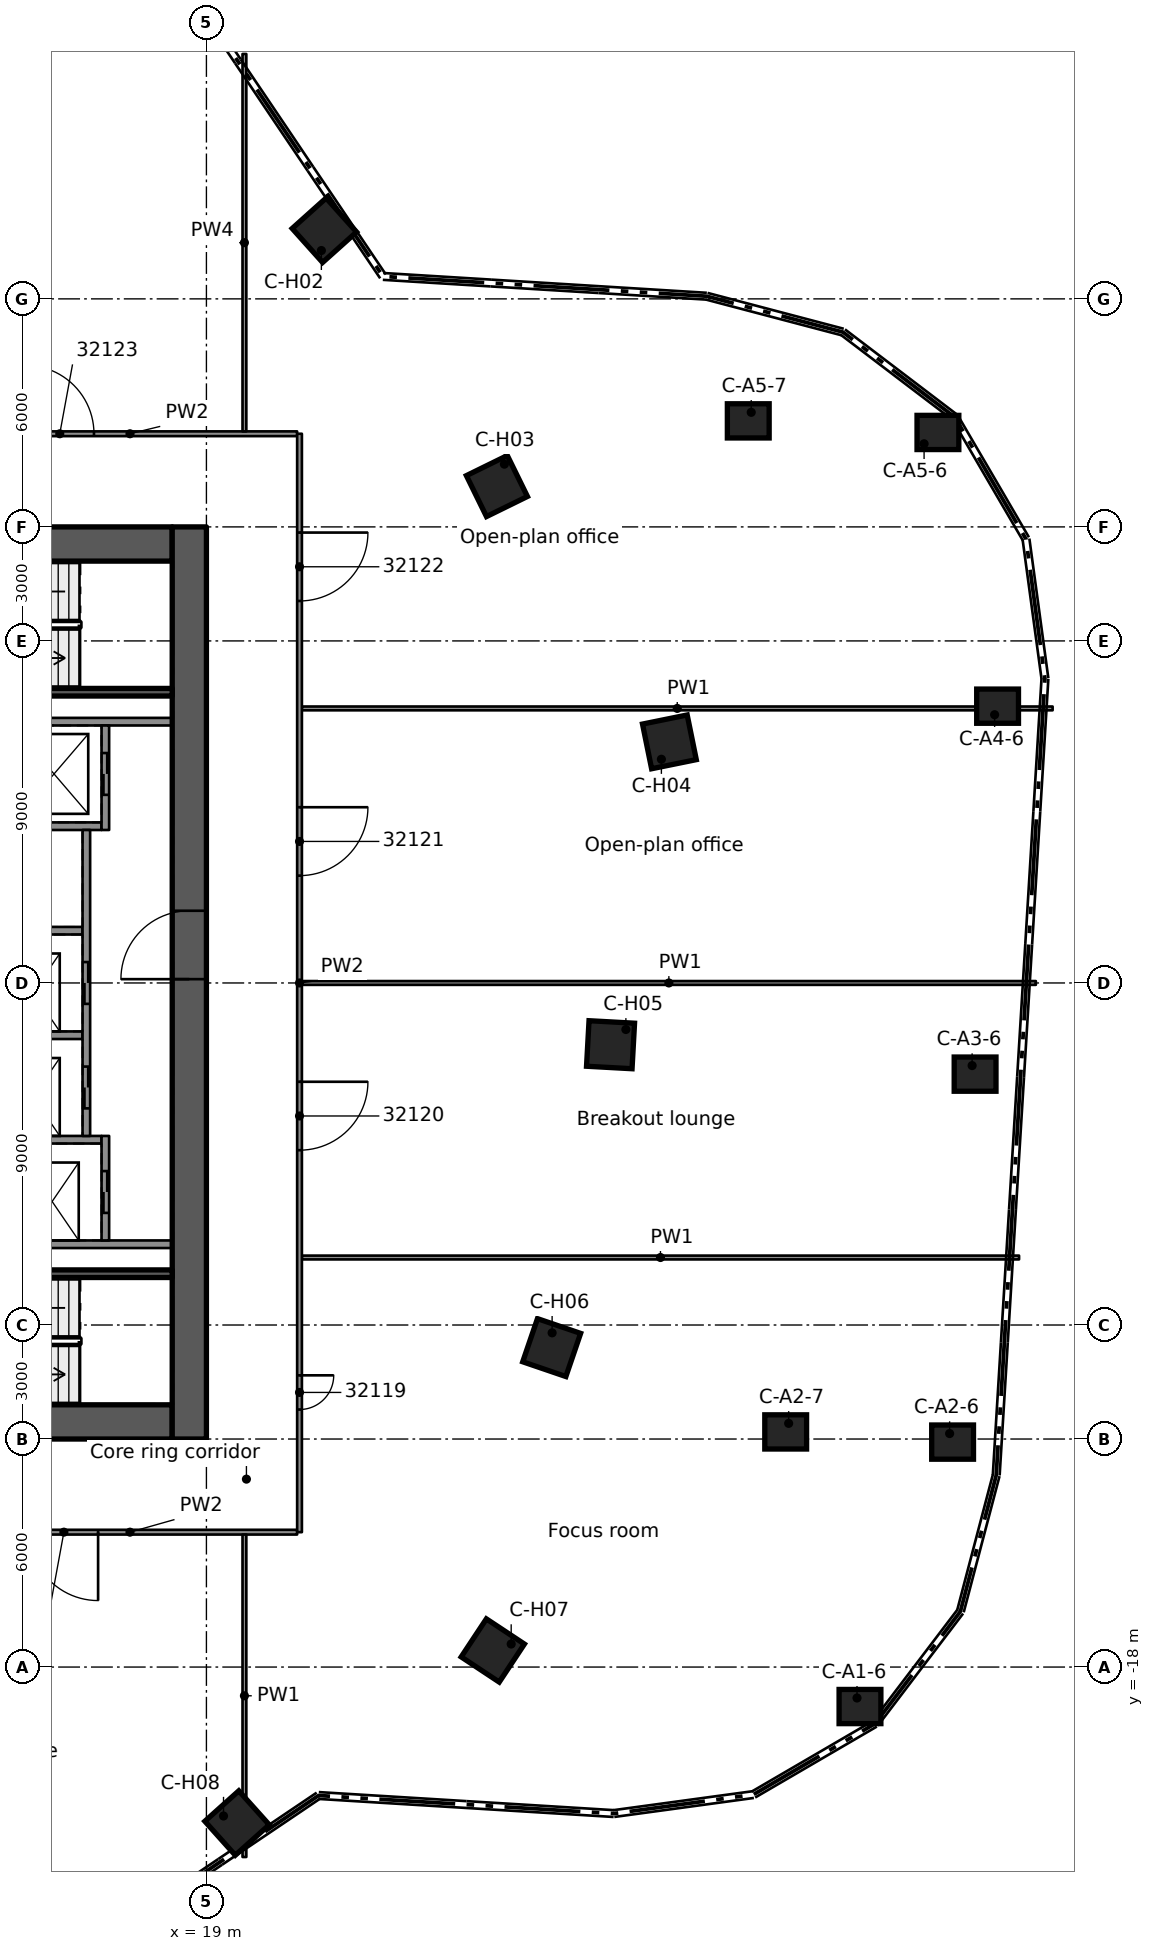
"""IFC4 building model, lengths in metres.
Left out: names, types, materials, properties, quantities, classifications, styles, units other than length and angle.
Written with IfcOpenShell. Run it as: python <this file> out.ifc"""

import sys

from ifc_helpers import new_model, si_unit, direction, frame, frame_2d, origin, origin_2d, place, context, subcontext, project, spatial, rectangle, extrude, element, fill, save


model = new_model("IFC4")
c1 = context("Model", 3, precision=1e-05, world=origin(), true_north=direction((0.0, 1.0)))
c2 = subcontext(c1, "Body", "Model", "MODEL_VIEW")
j1 = project(units=[si_unit("LENGTHUNIT", "METRE"), si_unit("PLANEANGLEUNIT", "RADIAN")], contexts=[c1])
p1 = place(None, origin())
s1 = spatial("IfcSite", under=j1, at=p1, CompositionType="ELEMENT")
p2 = place(p1, origin())
s2 = spatial("IfcBuilding", under=s1, at=p2, CompositionType="ELEMENT")
p3 = place(p2, frame((0.0, 0.0, 159.6)))
s3 = spatial("IfcBuildingStorey", under=s2, at=p3, CompositionType="ELEMENT", Elevation=159.6)
p4 = place(p3, frame((8.9, 11.55, 0.0), z_axis=(0.0, 0.0, 1.0), x_axis=(1.0, 0.0, 0.0)))
e1 = element("IfcWall", 1, at=p4, inside=s3, PredefinedType="SHEAR", context=c2, shape_type="SweptSolid", body=[
    extrude(rectangle(XDim=9.2, YDim=0.9, at=frame_2d((4.6, 0.0))), origin(), (0.0, 0.0, 1.0), 3.5),
])
p5 = place(p4, frame((3.0, 0.0, 0.0)))
e2 = element("IfcOpeningElement", 2, at=p5, cuts=e1, PredefinedType="OPENING", context=c2, shape_type="SweptSolid", body=[
    extrude(rectangle(XDim=1.1, YDim=2.1, at=frame_2d((0.55, 1.05))), frame((0.0, 0.46, 0.0), z_axis=(0.0, -1.0, 0.0), x_axis=(1.0, 0.0, 0.0)), (0.0, 0.0, 1.0), 0.92),
])
p6 = place(p3, frame((8.9, -11.55, 0.0), z_axis=(0.0, 0.0, 1.0), x_axis=(1.0, 0.0, 0.0)))
e3 = element("IfcWall", 3, at=p6, inside=s3, PredefinedType="SHEAR", context=c2, shape_type="SweptSolid", body=[
    extrude(rectangle(XDim=9.2, YDim=0.9, at=frame_2d((4.6, 0.0))), origin(), (0.0, 0.0, 1.0), 3.5),
])
p7 = place(p6, frame((3.0, 0.0, 0.0)))
e4 = element("IfcOpeningElement", 4, at=p7, cuts=e3, PredefinedType="OPENING", context=c2, shape_type="SweptSolid", body=[
    extrude(rectangle(XDim=1.1, YDim=2.1, at=frame_2d((0.55, 1.05))), frame((0.0, 0.46, 0.0), z_axis=(0.0, -1.0, 0.0), x_axis=(1.0, 0.0, 0.0)), (0.0, 0.0, 1.0), 0.92),
])
p8 = place(p3, frame((18.55, -12.0, 0.0), z_axis=(0.0, 0.0, 1.0), x_axis=(0.0, 1.0, 0.0)))
e5 = element("IfcWall", 5, at=p8, inside=s3, PredefinedType="SHEAR", context=c2, shape_type="SweptSolid", body=[
    extrude(rectangle(XDim=24.0, YDim=0.9, at=frame_2d((12.0, 0.0))), origin(), (0.0, 0.0, 1.0), 3.5),
])
p9 = place(p8, frame((12.1, 0.0, 0.0)))
e6 = element("IfcOpeningElement", 6, at=p9, cuts=e5, PredefinedType="OPENING", context=c2, shape_type="SweptSolid", body=[
    extrude(rectangle(XDim=1.8, YDim=2.1, at=frame_2d((0.9, 1.05))), frame((0.0, 0.46, 0.0), z_axis=(0.0, -1.0, 0.0), x_axis=(1.0, 0.0, 0.0)), (0.0, 0.0, 1.0), 0.92),
])
for number, where, z_axis, x_axis in (
    (7, (36.198, -19.039, 0.0), (0.0, 0.0, 1.0), (1.0, 0.0, 0.0)),
    (8, (38.635, -12.081, 0.0), (0.0, 0.0, 1.0), (1.0, 0.0, 0.0)),
    (9, (34.243, -11.813, 0.0), (0.0, 0.0, 1.0), (1.0, 0.0, 0.0)),
    (10, (39.227, -2.399, 0.0), (0.0, 0.0, 1.0), (1.0, 0.0, 0.0)),
    (11, (39.819, 7.283, 0.0), (0.0, 0.0, 1.0), (1.0, 0.0, 0.0)),
    (12, (38.249, 14.485, 0.0), (0.0, 0.0, 1.0), (1.0, 0.0, 0.0)),
    (13, (33.258, 14.79, 0.0), (0.0, 0.0, 1.0), (1.0, 0.0, 0.0)),
):
    element("IfcColumn", number, at=place(p3, frame(where, z_axis=z_axis, x_axis=x_axis)), inside=s3, PredefinedType="COLUMN", context=c2, shape_type="SweptSolid", body=[
        extrude(rectangle(XDim=1.1, YDim=0.9, at=origin_2d()), origin(), (0.0, 0.0, 1.0), 3.5),
    ])
for number, where, z_axis, x_axis in (
    (14, (22.104, 19.806, 0.0), (0.0, 0.0, 1.0), (0.745, 0.667, 0.0)),
    (15, (26.644, 13.075, 0.0), (0.0, 0.0, 1.0), (0.898, 0.441, 0.0)),
    (16, (31.183, 6.344, 0.0), (0.0, 0.0, 1.0), (0.98, 0.199, 0.0)),
    (17, (29.634, -1.625, 0.0), (0.0, 0.0, 1.0), (0.998, -0.055, 0.0)),
    (18, (28.085, -9.594, 0.0), (0.0, 0.0, 1.0), (0.946, -0.323, 0.0)),
    (19, (26.536, -17.564, 0.0), (0.0, 0.0, 1.0), (0.834, -0.552, 0.0)),
    (20, (19.806, -22.104, 0.0), (0.0, 0.0, 1.0), (0.667, -0.745, 0.0)),
):
    element("IfcColumn", number, at=place(p3, frame(where, z_axis=z_axis, x_axis=x_axis)), inside=s3, PredefinedType="COLUMN", context=c2, shape_type="SweptSolid", body=[
        extrude(rectangle(XDim=1.2, YDim=1.2, at=origin_2d()), origin(), (0.0, 0.0, 1.0), 3.5),
    ])
for number, where, z_axis, x_axis in (
    (21, (11.54, -6.875, 0.0), (0.0, 0.0, 1.0), (1.0, 0.0, 0.0)),
    (22, (11.54, 6.875, 0.0), (0.0, 0.0, 1.0), (1.0, 0.0, 0.0)),
):
    element("IfcWall", number, at=place(p3, frame(where, z_axis=z_axis, x_axis=x_axis)), inside=s3, PredefinedType="SOLIDWALL", context=c2, shape_type="SweptSolid", body=[
        extrude(rectangle(XDim=6.56, YDim=0.2, at=frame_2d((3.28, 0.0))), origin(), (0.0, 0.0, 1.0), 3.09),
    ])
p10 = place(p3, frame((11.54, 4.125, 0.0), z_axis=(0.0, 0.0, 1.0), x_axis=(1.0, 0.0, 0.0)))
e23 = element("IfcWall", 23, at=p10, inside=s3, PredefinedType="SOLIDWALL", context=c2, shape_type="SweptSolid", body=[
    extrude(rectangle(XDim=4.7, YDim=0.2, at=frame_2d((2.35, 0.0))), origin(), (0.0, 0.0, 1.0), 3.09),
])
p11 = place(p3, frame((13.74, 1.375, 0.0), z_axis=(0.0, 0.0, 1.0), x_axis=(1.0, 0.0, 0.0)))
e24 = element("IfcWall", 24, at=p11, inside=s3, PredefinedType="SOLIDWALL", context=c2, shape_type="SweptSolid", body=[
    extrude(rectangle(XDim=2.0, YDim=0.2, at=frame_2d((1.0, 0.0))), origin(), (0.0, 0.0, 1.0), 3.09),
])
p12 = place(p3, frame((11.54, -1.375, 0.0), z_axis=(0.0, 0.0, 1.0), x_axis=(1.0, 0.0, 0.0)))
e25 = element("IfcWall", 25, at=p12, inside=s3, PredefinedType="SOLIDWALL", context=c2, shape_type="SweptSolid", body=[
    extrude(rectangle(XDim=4.2, YDim=0.2, at=frame_2d((2.1, 0.0))), origin(), (0.0, 0.0, 1.0), 3.09),
])
p13 = place(p3, frame((11.54, -4.125, 0.0), z_axis=(0.0, 0.0, 1.0), x_axis=(1.0, 0.0, 0.0)))
e26 = element("IfcWall", 26, at=p13, inside=s3, PredefinedType="SOLIDWALL", context=c2, shape_type="SweptSolid", body=[
    extrude(rectangle(XDim=4.7, YDim=0.2, at=frame_2d((2.35, 0.0))), origin(), (0.0, 0.0, 1.0), 3.09),
])
p14 = place(p3, frame((16.34, 6.775, 0.0), z_axis=(0.0, 0.0, 1.0), x_axis=(0.0, -1.0, 0.0)))
e27 = element("IfcWall", 27, at=p14, inside=s3, PredefinedType="SOLIDWALL", context=c2, shape_type="SweptSolid", body=[
    extrude(rectangle(XDim=2.75, YDim=0.2, at=frame_2d((1.375, 0.0))), origin(), (0.0, 0.0, 1.0), 3.09),
])
p15 = place(p14, frame((0.725, 0.0, 0.0)))
e28 = element("IfcOpeningElement", 28, at=p15, cuts=e27, PredefinedType="OPENING", context=c2, shape_type="SweptSolid", body=[
    extrude(rectangle(XDim=1.1, YDim=2.1, at=frame_2d((0.55, 1.05))), frame((0.0, 0.11, 0.0), z_axis=(0.0, -1.0, 0.0), x_axis=(1.0, 0.0, 0.0)), (0.0, 0.0, 1.0), 0.22),
])
p16 = place(p3, frame((15.84, 4.025, 0.0), z_axis=(0.0, 0.0, 1.0), x_axis=(0.0, -1.0, 0.0)))
e29 = element("IfcWall", 29, at=p16, inside=s3, PredefinedType="SOLIDWALL", context=c2, shape_type="SweptSolid", body=[
    extrude(rectangle(XDim=8.05, YDim=0.2, at=frame_2d((4.025, 0.0))), origin(), (0.0, 0.0, 1.0), 3.09),
])
p17 = place(p16, frame((3.475, 0.0, 0.0)))
e30 = element("IfcOpeningElement", 30, at=p17, cuts=e29, PredefinedType="OPENING", context=c2, shape_type="SweptSolid", body=[
    extrude(rectangle(XDim=1.1, YDim=2.1, at=frame_2d((0.55, 1.05))), frame((0.0, 0.11, 0.0), z_axis=(0.0, -1.0, 0.0), x_axis=(1.0, 0.0, 0.0)), (0.0, 0.0, 1.0), 0.22),
])
p18 = place(p16, frame((6.225, 0.0, 0.0)))
e31 = element("IfcOpeningElement", 31, at=p18, cuts=e29, PredefinedType="OPENING", context=c2, shape_type="SweptSolid", body=[
    extrude(rectangle(XDim=1.1, YDim=2.1, at=frame_2d((0.55, 1.05))), frame((0.0, 0.11, 0.0), z_axis=(0.0, -1.0, 0.0), x_axis=(1.0, 0.0, 0.0)), (0.0, 0.0, 1.0), 0.22),
])
p19 = place(p3, frame((16.34, -4.025, 0.0), z_axis=(0.0, 0.0, 1.0), x_axis=(0.0, -1.0, 0.0)))
e32 = element("IfcWall", 32, at=p19, inside=s3, PredefinedType="SOLIDWALL", context=c2, shape_type="SweptSolid", body=[
    extrude(rectangle(XDim=2.75, YDim=0.2, at=frame_2d((1.375, 0.0))), origin(), (0.0, 0.0, 1.0), 3.09),
])
p20 = place(p19, frame((0.925, 0.0, 0.0)))
e33 = element("IfcOpeningElement", 33, at=p20, cuts=e32, PredefinedType="OPENING", context=c2, shape_type="SweptSolid", body=[
    extrude(rectangle(XDim=1.1, YDim=2.1, at=frame_2d((0.55, 1.05))), frame((0.0, 0.11, 0.0), z_axis=(0.0, -1.0, 0.0), x_axis=(1.0, 0.0, 0.0)), (0.0, 0.0, 1.0), 0.22),
])
for number, where, z_axis, x_axis in (
    (34, (11.54, -7.65, 0.0), (0.0, 0.0, 1.0), (1.0, 0.0, 0.0)),
    (35, (11.54, 7.65, 0.0), (0.0, 0.0, 1.0), (1.0, 0.0, 0.0)),
):
    element("IfcWall", number, at=place(p3, frame(where, z_axis=z_axis, x_axis=x_axis)), inside=s3, PredefinedType="SOLIDWALL", context=c2, shape_type="SweptSolid", body=[
        extrude(rectangle(XDim=6.56, YDim=0.2, at=frame_2d((3.28, 0.0))), origin(), (0.0, 0.0, 1.0), 3.09),
    ])
p21 = place(p3, frame((21.387, -14.451, 0.0), z_axis=(0.0, 0.0, 1.0), x_axis=(-1.0, 0.0, 0.0)))
e36 = element("IfcWall", 36, at=p21, inside=s3, PredefinedType="PARTITIONING", context=c2, shape_type="SweptSolid", body=[
    extrude(rectangle(XDim=10.996, YDim=0.125, at=frame_2d((5.498, 0.0))), origin(), (0.0, 0.0, 1.0), 3.08),
])
p22 = place(p21, frame((5.238, 0.0, 0.0)))
e37 = element("IfcOpeningElement", 37, at=p22, cuts=e36, PredefinedType="OPENING", context=c2, shape_type="SweptSolid", body=[
    extrude(rectangle(XDim=1.8, YDim=2.1, at=frame_2d((0.9, 1.05))), frame((0.0, 0.073, 0.0), z_axis=(0.0, -1.0, 0.0), x_axis=(1.0, 0.0, 0.0)), (0.0, 0.0, 1.0), 0.145),
])
p23 = place(p3, frame((21.512, -7.224, 0.0), z_axis=(0.0, 0.0, 1.0), x_axis=(1.0, 0.0, 0.0)))
e38 = element("IfcWall", 38, at=p23, inside=s3, PredefinedType="PARTITIONING", context=c2, shape_type="SweptSolid", body=[
    extrude(rectangle(XDim=18.872, YDim=0.1, at=frame_2d((9.436, 0.0))), origin(), (0.0, 0.0, 1.0), 3.08),
])
p24 = place(p3, frame((21.512, 0.0, 0.0), z_axis=(0.0, 0.0, 1.0), x_axis=(1.0, 0.0, 0.0)))
e39 = element("IfcWall", 39, at=p24, inside=s3, PredefinedType="PARTITIONING", context=c2, shape_type="SweptSolid", body=[
    extrude(rectangle(XDim=19.314, YDim=0.1, at=frame_2d((9.657, 0.0))), origin(), (0.0, 0.0, 1.0), 3.08),
])
p25 = place(p3, frame((21.512, 7.224, 0.0), z_axis=(0.0, 0.0, 1.0), x_axis=(1.0, 0.0, 0.0)))
e40 = element("IfcWall", 40, at=p25, inside=s3, PredefinedType="PARTITIONING", context=c2, shape_type="SweptSolid", body=[
    extrude(rectangle(XDim=19.755, YDim=0.1, at=frame_2d((9.877, 0.0))), origin(), (0.0, 0.0, 1.0), 3.08),
])
p26 = place(p3, frame((10.391, 14.451, 0.0), z_axis=(0.0, 0.0, 1.0), x_axis=(1.0, 0.0, 0.0)))
e41 = element("IfcWall", 41, at=p26, inside=s3, PredefinedType="PARTITIONING", context=c2, shape_type="SweptSolid", body=[
    extrude(rectangle(XDim=10.996, YDim=0.125, at=frame_2d((5.498, 0.0))), origin(), (0.0, 0.0, 1.0), 3.08),
])
p27 = place(p26, frame((3.85, 0.0, 0.0)))
e42 = element("IfcOpeningElement", 42, at=p27, cuts=e41, PredefinedType="OPENING", context=c2, shape_type="SweptSolid", body=[
    extrude(rectangle(XDim=1.8, YDim=2.1, at=frame_2d((0.9, 1.05))), frame((0.0, 0.073, 0.0), z_axis=(0.0, -1.0, 0.0), x_axis=(1.0, 0.0, 0.0)), (0.0, 0.0, 1.0), 0.145),
])
p28 = place(p3, frame((21.45, 14.451, 0.0), z_axis=(0.0, 0.0, 1.0), x_axis=(0.0, -1.0, 0.0)))
e43 = element("IfcWall", 43, at=p28, inside=s3, PredefinedType="PARTITIONING", context=c2, shape_type="SweptSolid", body=[
    extrude(rectangle(XDim=28.902, YDim=0.125, at=frame_2d((14.451, 0.0))), origin(), (0.0, 0.0, 1.0), 3.08),
])
p29 = place(p28, frame((24.775, 0.0, 0.0)))
e44 = element("IfcOpeningElement", 44, at=p29, cuts=e43, PredefinedType="OPENING", context=c2, shape_type="SweptSolid", body=[
    extrude(rectangle(XDim=0.9, YDim=2.1, at=frame_2d((0.45, 1.05))), frame((0.0, 0.073, 0.0), z_axis=(0.0, -1.0, 0.0), x_axis=(1.0, 0.0, 0.0)), (0.0, 0.0, 1.0), 0.145),
])
p30 = place(p28, frame((17.051, 0.0, 0.0)))
e45 = element("IfcOpeningElement", 45, at=p30, cuts=e43, PredefinedType="OPENING", context=c2, shape_type="SweptSolid", body=[
    extrude(rectangle(XDim=1.8, YDim=2.1, at=frame_2d((0.9, 1.05))), frame((0.0, 0.073, 0.0), z_axis=(0.0, -1.0, 0.0), x_axis=(1.0, 0.0, 0.0)), (0.0, 0.0, 1.0), 0.145),
])
p31 = place(p28, frame((9.827, 0.0, 0.0)))
e46 = element("IfcOpeningElement", 46, at=p31, cuts=e43, PredefinedType="OPENING", context=c2, shape_type="SweptSolid", body=[
    extrude(rectangle(XDim=1.8, YDim=2.1, at=frame_2d((0.9, 1.05))), frame((0.0, 0.073, 0.0), z_axis=(0.0, -1.0, 0.0), x_axis=(1.0, 0.0, 0.0)), (0.0, 0.0, 1.0), 0.145),
])
p32 = place(p28, frame((2.6, 0.0, 0.0)))
e47 = element("IfcOpeningElement", 47, at=p32, cuts=e43, PredefinedType="OPENING", context=c2, shape_type="SweptSolid", body=[
    extrude(rectangle(XDim=1.8, YDim=2.1, at=frame_2d((0.9, 1.05))), frame((0.0, 0.073, 0.0), z_axis=(0.0, -1.0, 0.0), x_axis=(1.0, 0.0, 0.0)), (0.0, 0.0, 1.0), 0.145),
])
p33 = place(p3, frame((20.0, -22.998, 0.0), z_axis=(0.0, 0.0, 1.0), x_axis=(0.0, 1.0, 0.0)))
e48 = element("IfcWall", 48, at=p33, inside=s3, PredefinedType="PARTITIONING", context=c2, shape_type="SweptSolid", body=[
    extrude(rectangle(XDim=8.484, YDim=0.1, at=frame_2d((4.242, 0.0))), origin(), (0.0, 0.0, 1.0), 3.08),
])
p34 = place(p3, frame((20.0, 14.514, 0.0), z_axis=(0.0, 0.0, 1.0), x_axis=(0.0, 1.0, 0.0)))
e49 = element("IfcWall", 49, at=p34, inside=s3, PredefinedType="PARTITIONING", context=c2, shape_type="SweptSolid", body=[
    extrude(rectangle(XDim=9.93, YDim=0.1, at=frame_2d((4.965, 0.0))), origin(), (0.0, 0.0, 1.0), 2.445),
])
p35 = place(p15, origin())
e50 = element("IfcDoor", 50, at=p35, inside=s3, OperationType="DOUBLE_DOOR_SLIDING", PredefinedType="DOOR", context=c2, shape_type="SweptSolid", body=[
    extrude(rectangle(XDim=1.1, YDim=2.1, at=frame_2d((0.55, 1.05))), frame((0.0, 0.025, 0.0), z_axis=(0.0, -1.0, 0.0), x_axis=(1.0, 0.0, 0.0)), (0.0, 0.0, 1.0), 0.05),
])
fill(e28, e50)
p36 = place(p17, origin())
e51 = element("IfcDoor", 51, at=p36, inside=s3, OperationType="DOUBLE_DOOR_SLIDING", PredefinedType="DOOR", context=c2, shape_type="SweptSolid", body=[
    extrude(rectangle(XDim=1.1, YDim=2.1, at=frame_2d((0.55, 1.05))), frame((0.0, 0.025, 0.0), z_axis=(0.0, -1.0, 0.0), x_axis=(1.0, 0.0, 0.0)), (0.0, 0.0, 1.0), 0.05),
])
fill(e30, e51)
p37 = place(p18, origin())
e52 = element("IfcDoor", 52, at=p37, inside=s3, OperationType="DOUBLE_DOOR_SLIDING", PredefinedType="DOOR", context=c2, shape_type="SweptSolid", body=[
    extrude(rectangle(XDim=1.1, YDim=2.1, at=frame_2d((0.55, 1.05))), frame((0.0, 0.025, 0.0), z_axis=(0.0, -1.0, 0.0), x_axis=(1.0, 0.0, 0.0)), (0.0, 0.0, 1.0), 0.05),
])
fill(e31, e52)
p38 = place(p20, origin())
e53 = element("IfcDoor", 53, at=p38, inside=s3, OperationType="DOUBLE_DOOR_SLIDING", PredefinedType="DOOR", context=c2, shape_type="SweptSolid", body=[
    extrude(rectangle(XDim=1.1, YDim=2.1, at=frame_2d((0.55, 1.05))), frame((0.0, 0.025, 0.0), z_axis=(0.0, -1.0, 0.0), x_axis=(1.0, 0.0, 0.0)), (0.0, 0.0, 1.0), 0.05),
])
fill(e33, e53)
p39 = place(p9, origin())
e54 = element("IfcDoor", 54, at=p39, inside=s3, OperationType="SINGLE_SWING_RIGHT", PredefinedType="DOOR", context=c2, shape_type="SweptSolid", body=[
    extrude(rectangle(XDim=1.8, YDim=2.1, at=frame_2d((0.9, 1.05))), frame((0.0, 0.025, 0.0), z_axis=(0.0, -1.0, 0.0), x_axis=(1.0, 0.0, 0.0)), (0.0, 0.0, 1.0), 0.05),
])
fill(e6, e54)
p40 = place(p22, origin())
e55 = element("IfcDoor", 55, at=p40, inside=s3, OperationType="DOUBLE_DOOR_SINGLE_SWING", PredefinedType="DOOR", context=c2, shape_type="SweptSolid", body=[
    extrude(rectangle(XDim=1.8, YDim=2.1, at=frame_2d((0.9, 1.05))), frame((0.0, 0.025, 0.0), z_axis=(0.0, -1.0, 0.0), x_axis=(1.0, 0.0, 0.0)), (0.0, 0.0, 1.0), 0.05),
])
fill(e37, e55)
p41 = place(p29, origin())
e56 = element("IfcDoor", 56, at=p41, inside=s3, OperationType="SINGLE_SWING_RIGHT", PredefinedType="DOOR", context=c2, shape_type="SweptSolid", body=[
    extrude(rectangle(XDim=0.9, YDim=2.1, at=frame_2d((0.45, 1.05))), frame((0.0, 0.025, 0.0), z_axis=(0.0, -1.0, 0.0), x_axis=(1.0, 0.0, 0.0)), (0.0, 0.0, 1.0), 0.05),
])
fill(e44, e56)
p42 = place(p30, origin())
e57 = element("IfcDoor", 57, at=p42, inside=s3, OperationType="DOUBLE_DOOR_SINGLE_SWING", PredefinedType="DOOR", context=c2, shape_type="SweptSolid", body=[
    extrude(rectangle(XDim=1.8, YDim=2.1, at=frame_2d((0.9, 1.05))), frame((0.0, 0.025, 0.0), z_axis=(0.0, -1.0, 0.0), x_axis=(1.0, 0.0, 0.0)), (0.0, 0.0, 1.0), 0.05),
])
fill(e45, e57)
p43 = place(p31, origin())
e58 = element("IfcDoor", 58, at=p43, inside=s3, OperationType="DOUBLE_DOOR_SINGLE_SWING", PredefinedType="DOOR", context=c2, shape_type="SweptSolid", body=[
    extrude(rectangle(XDim=1.8, YDim=2.1, at=frame_2d((0.9, 1.05))), frame((0.0, 0.025, 0.0), z_axis=(0.0, -1.0, 0.0), x_axis=(1.0, 0.0, 0.0)), (0.0, 0.0, 1.0), 0.05),
])
fill(e46, e58)
p44 = place(p32, origin())
e59 = element("IfcDoor", 59, at=p44, inside=s3, OperationType="DOUBLE_DOOR_SINGLE_SWING", PredefinedType="DOOR", context=c2, shape_type="SweptSolid", body=[
    extrude(rectangle(XDim=1.8, YDim=2.1, at=frame_2d((0.9, 1.05))), frame((0.0, 0.025, 0.0), z_axis=(0.0, -1.0, 0.0), x_axis=(1.0, 0.0, 0.0)), (0.0, 0.0, 1.0), 0.05),
])
fill(e47, e59)
p45 = place(p27, origin())
e60 = element("IfcDoor", 60, at=p45, inside=s3, OperationType="DOUBLE_DOOR_SINGLE_SWING", PredefinedType="DOOR", context=c2, shape_type="SweptSolid", body=[
    extrude(rectangle(XDim=1.8, YDim=2.1, at=frame_2d((0.9, 1.05))), frame((0.0, 0.025, 0.0), z_axis=(0.0, -1.0, 0.0), x_axis=(1.0, 0.0, 0.0)), (0.0, 0.0, 1.0), 0.05),
])
fill(e42, e60)
save(model, sys.argv[1])
